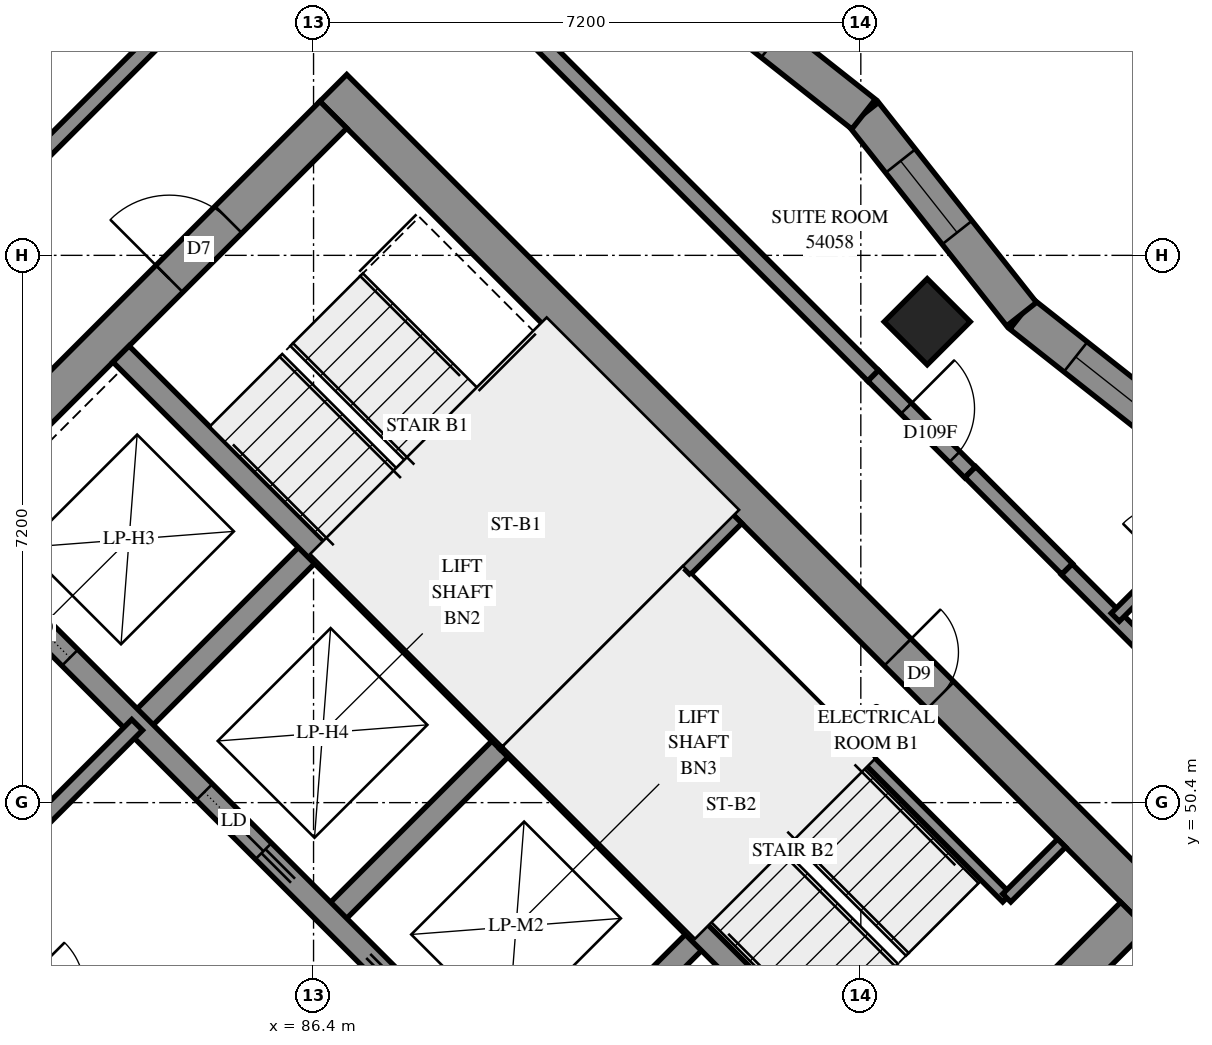
"""IFC4 building model, lengths in metres.
Left out: names, types, materials, properties, quantities, classifications, styles, units other than length and angle.
Written with IfcOpenShell. Run it as: python <this file> out.ifc"""

import sys

from ifc_helpers import new_model, si_unit, direction, frame, frame_2d, origin, origin_2d, place, context, subcontext, project, spatial, polyline, rectangle, outline, extrude, element, fill, save


model = new_model("IFC4")
c1 = context("Model", 3, precision=1e-05, world=origin(), true_north=direction((0.0, 1.0)))
c2 = subcontext(c1, "Body", "Model", "MODEL_VIEW")
j1 = project(units=[si_unit("LENGTHUNIT", "METRE"), si_unit("PLANEANGLEUNIT", "RADIAN")], contexts=[c1])
p1 = place(None, origin())
s1 = spatial("IfcSite", under=j1, at=p1, CompositionType="ELEMENT")
p2 = place(p1, origin())
s2 = spatial("IfcBuilding", under=s1, at=p2, CompositionType="ELEMENT")
p3 = place(p2, frame((0.0, 0.0, 199.8)))
s3 = spatial("IfcBuildingStorey", under=s2, at=p3, CompositionType="ELEMENT", Elevation=199.8)
p4 = place(p3, frame((94.474, 56.727, 0.0), z_axis=(0.0, 0.0, 1.0), x_axis=(0.7071067812, -0.7071067812, 0.0)))
e1 = element("IfcColumn", 1, at=p4, inside=s3, PredefinedType="COLUMN", context=c2, shape_type="SweptSolid", body=[
    extrude(rectangle(XDim=0.8, YDim=0.8, at=origin_2d()), origin(), (0.0, 0.0, 1.0), 3.1),
])
p5 = place(p3, frame((76.124, 49.267, -0.3), z_axis=(0.0, 0.0, 1.0), x_axis=(0.7071067812, -0.7071067812, 0.0)))
e2 = element("IfcWall", 2, at=p5, inside=s3, PredefinedType="SHEAR", context=c2, shape_type="SweptSolid", body=[
    extrude(rectangle(XDim=15.4, YDim=0.5, at=frame_2d((7.7, 0.0))), origin(), (0.0, 0.0, 1.0), 2.7),
])
p6 = place(p3, frame((86.66, 59.802, -0.3), z_axis=(0.0, 0.0, 1.0), x_axis=(0.7071067812, -0.7071067812, 0.0)))
e3 = element("IfcWall", 3, at=p6, inside=s3, PredefinedType="SHEAR", context=c2, shape_type="SweptSolid", body=[
    extrude(rectangle(XDim=15.4, YDim=0.5, at=frame_2d((7.7, 0.0))), origin(), (0.0, 0.0, 1.0), 2.7),
])
p7 = place(p6, frame((10.5, 0.0, 0.3)))
e4 = element("IfcOpeningElement", 4, at=p7, cuts=e3, PredefinedType="OPENING", context=c2, shape_type="SweptSolid", body=[
    extrude(rectangle(XDim=0.8, YDim=2.1, at=frame_2d((0.4, 1.05))), frame((0.0, 0.26, 0.0), z_axis=(0.0, -1.0, 0.0), x_axis=(1.0, 0.0, 0.0)), (0.0, 0.0, 1.0), 0.52),
])
p8 = place(p3, frame((76.478, 49.267, -0.3), z_axis=(0.0, 0.0, 1.0), x_axis=(0.7071067812, 0.7071067812, 0.0)))
e5 = element("IfcWall", 5, at=p8, inside=s3, PredefinedType="SHEAR", context=c2, shape_type="SweptSolid", body=[
    extrude(rectangle(XDim=14.4, YDim=0.5, at=frame_2d((7.2, 0.0))), origin(), (0.0, 0.0, 1.0), 2.7),
])
p9 = place(p8, frame((4.55, 0.0, 0.3)))
e6 = element("IfcOpeningElement", 6, at=p9, cuts=e5, PredefinedType="OPENING", context=c2, shape_type="SweptSolid", body=[
    extrude(rectangle(XDim=1.1, YDim=2.1, at=frame_2d((0.55, 1.05))), frame((0.0, 0.26, 0.0), z_axis=(0.0, -1.0, 0.0), x_axis=(1.0, 0.0, 0.0)), (0.0, 0.0, 1.0), 0.52),
])
p10 = place(p8, frame((11.35, 0.0, 0.3)))
e7 = element("IfcOpeningElement", 7, at=p10, cuts=e5, PredefinedType="OPENING", context=c2, shape_type="SweptSolid", body=[
    extrude(rectangle(XDim=1.1, YDim=2.1, at=frame_2d((0.55, 1.05))), frame((0.0, 0.26, 0.0), z_axis=(0.0, -1.0, 0.0), x_axis=(1.0, 0.0, 0.0)), (0.0, 0.0, 1.0), 0.52),
])
p11 = place(p3, frame((87.013, 38.731, -0.3), z_axis=(0.0, 0.0, 1.0), x_axis=(0.7071067812, 0.7071067812, 0.0)))
e8 = element("IfcWall", 8, at=p11, inside=s3, PredefinedType="SHEAR", context=c2, shape_type="SweptSolid", body=[
    extrude(rectangle(XDim=14.4, YDim=0.5, at=frame_2d((7.2, 0.0))), origin(), (0.0, 0.0, 1.0), 2.7),
])
p12 = place(p11, frame((4.55, 0.0, 0.3)))
e9 = element("IfcOpeningElement", 9, at=p12, cuts=e8, PredefinedType="OPENING", context=c2, shape_type="SweptSolid", body=[
    extrude(rectangle(XDim=1.1, YDim=2.1, at=frame_2d((0.55, 1.05))), frame((0.0, 0.26, 0.0), z_axis=(0.0, -1.0, 0.0), x_axis=(1.0, 0.0, 0.0)), (0.0, 0.0, 1.0), 0.52),
])
p13 = place(p11, frame((11.35, 0.0, 0.3)))
e10 = element("IfcOpeningElement", 10, at=p13, cuts=e8, PredefinedType="OPENING", context=c2, shape_type="SweptSolid", body=[
    extrude(rectangle(XDim=1.1, YDim=2.1, at=frame_2d((0.55, 1.05))), frame((0.0, 0.26, 0.0), z_axis=(0.0, -1.0, 0.0), x_axis=(1.0, 0.0, 0.0)), (0.0, 0.0, 1.0), 0.52),
])
p14 = place(p3, frame((84.079, 51.423, 0.0), z_axis=(0.0, 0.0, 1.0), x_axis=(0.7071219326, 0.7070916295, 0.0)))
e11 = element("IfcWall", 11, at=p14, inside=s3, PredefinedType="SOLIDWALL", context=c2, shape_type="SweptSolid", body=[
    extrude(rectangle(XDim=3.3, YDim=0.3, at=frame_2d((1.65, 0.0))), origin(), (0.0, 0.0, 1.0), 3.1),
])
for number, where, z_axis, x_axis in (
    (12, (86.625, 48.878, 0.0), (0.0, 0.0, 1.0), (0.707, 0.707, 0.0)),
    (13, (89.17, 46.332, 0.0), (0.0, 0.0, 1.0), (0.707, 0.707, 0.0)),
):
    element("IfcWall", number, at=place(p3, frame(where, z_axis=z_axis, x_axis=x_axis)), inside=s3, PredefinedType="SOLIDWALL", context=c2, shape_type="SweptSolid", body=[
        extrude(rectangle(XDim=3.3, YDim=0.3, at=frame_2d((1.65, 0.0))), origin(), (0.0, 0.0, 1.0), 3.1),
    ])
p15 = place(p3, frame((78.988, 51.423, 0.0), z_axis=(0.0, 0.0, 1.0), x_axis=(0.7071067812, -0.7071067812, 0.0)))
e14 = element("IfcWall", 14, at=p15, inside=s3, PredefinedType="SOLIDWALL", context=c2, shape_type="SweptSolid", body=[
    extrude(rectangle(XDim=14.4, YDim=0.3, at=frame_2d((7.2, 0.0))), origin(), (0.0, 0.0, 1.0), 3.1),
])
p16 = place(p15, frame((1.35, 0.0, 0.0)))
e15 = element("IfcOpeningElement", 15, at=p16, cuts=e14, PredefinedType="OPENING", context=c2, shape_type="SweptSolid", body=[
    extrude(rectangle(XDim=0.9, YDim=2.1, at=frame_2d((0.45, 1.05))), frame((0.0, 0.16, 0.0), z_axis=(0.0, -1.0, 0.0), x_axis=(1.0, 0.0, 0.0)), (0.0, 0.0, 1.0), 0.32),
])
p17 = place(p15, frame((4.95, 0.0, 0.0)))
e16 = element("IfcOpeningElement", 16, at=p17, cuts=e14, PredefinedType="OPENING", context=c2, shape_type="SweptSolid", body=[
    extrude(rectangle(XDim=0.9, YDim=2.1, at=frame_2d((0.45, 1.05))), frame((0.0, 0.16, 0.0), z_axis=(0.0, -1.0, 0.0), x_axis=(1.0, 0.0, 0.0)), (0.0, 0.0, 1.0), 0.32),
])
p18 = place(p15, frame((8.55, 0.0, 0.0)))
e17 = element("IfcOpeningElement", 17, at=p18, cuts=e14, PredefinedType="OPENING", context=c2, shape_type="SweptSolid", body=[
    extrude(rectangle(XDim=0.9, YDim=2.1, at=frame_2d((0.45, 1.05))), frame((0.0, 0.16, 0.0), z_axis=(0.0, -1.0, 0.0), x_axis=(1.0, 0.0, 0.0)), (0.0, 0.0, 1.0), 0.32),
])
p19 = place(p15, frame((12.05, 0.0, 0.0)))
e18 = element("IfcOpeningElement", 18, at=p19, cuts=e14, PredefinedType="OPENING", context=c2, shape_type="SweptSolid", body=[
    extrude(rectangle(XDim=1.1, YDim=2.1, at=frame_2d((0.55, 1.05))), frame((0.0, 0.16, 0.0), z_axis=(0.0, -1.0, 0.0), x_axis=(1.0, 0.0, 0.0)), (0.0, 0.0, 1.0), 0.32),
])
p20 = place(p3, frame((81.534, 53.969, 0.0), z_axis=(0.0, 0.0, 1.0), x_axis=(0.707103309, -0.7071102534, 0.0)))
e19 = element("IfcWall", 19, at=p20, inside=s3, PredefinedType="SOLIDWALL", context=c2, shape_type="SweptSolid", body=[
    extrude(rectangle(XDim=14.4, YDim=0.3, at=frame_2d((7.2, 0.0))), origin(), (0.0, 0.0, 1.0), 3.1),
])
p21 = place(p20, frame((1.25, 0.0, 0.0)))
e20 = element("IfcOpeningElement", 20, at=p21, cuts=e19, PredefinedType="OPENING", context=c2, shape_type="SweptSolid", body=[
    extrude(rectangle(XDim=1.1, YDim=2.1, at=frame_2d((0.55, 1.05))), frame((0.0, 0.16, 0.0), z_axis=(0.0, -1.0, 0.0), x_axis=(1.0, 0.0, 0.0)), (0.0, 0.0, 1.0), 0.32),
])
p22 = place(p20, frame((4.85, 0.0, 0.0)))
e21 = element("IfcOpeningElement", 21, at=p22, cuts=e19, PredefinedType="OPENING", context=c2, shape_type="SweptSolid", body=[
    extrude(rectangle(XDim=1.1, YDim=2.1, at=frame_2d((0.55, 1.05))), frame((0.0, 0.16, 0.0), z_axis=(0.0, -1.0, 0.0), x_axis=(1.0, 0.0, 0.0)), (0.0, 0.0, 1.0), 0.32),
])
p23 = place(p20, frame((8.45, 0.0, 0.0)))
e22 = element("IfcOpeningElement", 22, at=p23, cuts=e19, PredefinedType="OPENING", context=c2, shape_type="SweptSolid", body=[
    extrude(rectangle(XDim=1.1, YDim=2.1, at=frame_2d((0.55, 1.05))), frame((0.0, 0.16, 0.0), z_axis=(0.0, -1.0, 0.0), x_axis=(1.0, 0.0, 0.0)), (0.0, 0.0, 1.0), 0.32),
])
p24 = place(p20, frame((12.05, 0.0, 0.0)))
e23 = element("IfcOpeningElement", 23, at=p24, cuts=e19, PredefinedType="OPENING", context=c2, shape_type="SweptSolid", body=[
    extrude(rectangle(XDim=1.1, YDim=2.1, at=frame_2d((0.55, 1.05))), frame((0.0, 0.16, 0.0), z_axis=(0.0, -1.0, 0.0), x_axis=(1.0, 0.0, 0.0)), (0.0, 0.0, 1.0), 0.32),
])
for number, where, z_axis, x_axis in (
    (24, (83.867, 56.302, 0.0), (0.0, 0.0, 1.0), (0.707, -0.707, 0.0)),
    (25, (88.958, 51.211, 0.0), (0.0, 0.0, 1.0), (0.707, -0.707, 0.0)),
):
    element("IfcWall", number, at=place(p3, frame(where, z_axis=z_axis, x_axis=x_axis)), inside=s3, PredefinedType="SOLIDWALL", context=c2, shape_type="SweptSolid", body=[
        extrude(rectangle(XDim=7.2, YDim=0.3, at=frame_2d((3.6, 0.0))), origin(), (0.0, 0.0, 1.0), 3.1),
    ])
p25 = place(p3, frame((88.958, 51.211, 0.0), z_axis=(0.0, 0.0, 1.0), x_axis=(0.7071067812, 0.7071067812, 0.0)))
e26 = element("IfcWall", 26, at=p25, inside=s3, PredefinedType="SOLIDWALL", context=c2, shape_type="SweptSolid", body=[
    extrude(rectangle(XDim=4.2, YDim=0.3, at=frame_2d((2.1, 0.0))), origin(), (0.0, 0.0, 1.0), 3.1),
])
p26 = place(p3, frame((98.347, 54.747, 0.0), z_axis=(0.0, 0.0, 1.0), x_axis=(-0.7847316147, 0.6198356984, 0.0)))
e27 = element("IfcWall", 27, at=p26, inside=s3, PredefinedType="SOLIDWALL", context=c2, shape_type="SweptSolid", body=[
    extrude(outline(polyline([(-0.029, -0.25), (3.324, -0.25), (3.383, 0.25), (0.029, 0.25), (-0.029, -0.25)])), origin(), (0.0, 0.0, 1.0), 3.1),
])
p27 = place(p26, frame((1.248, 0.0, 0.45)))
e28 = element("IfcOpeningElement", 28, at=p27, cuts=e27, PredefinedType="OPENING", context=c2, shape_type="SweptSolid", body=[
    extrude(rectangle(XDim=1.2, YDim=2.5, at=frame_2d((0.6, 1.25))), frame((0.0, 0.26, 0.0), z_axis=(0.0, -1.0, 0.0), x_axis=(1.0, 0.0, 0.0)), (0.0, 0.0, 1.0), 0.52),
])
p28 = place(p3, frame((95.715, 56.826, 0.0), z_axis=(0.0, 0.0, 1.0), x_axis=(-0.6198356984, 0.7847316147, 0.0)))
e29 = element("IfcWall", 29, at=p28, inside=s3, PredefinedType="SOLIDWALL", context=c2, shape_type="SweptSolid", body=[
    extrude(outline(polyline([(0.029, -0.25), (3.383, -0.25), (3.324, 0.25), (-0.029, 0.25), (0.029, -0.25)])), origin(), (0.0, 0.0, 1.0), 3.1),
])
p29 = place(p28, frame((1.369, 0.0, 0.45)))
e30 = element("IfcOpeningElement", 30, at=p29, cuts=e29, PredefinedType="OPENING", context=c2, shape_type="SweptSolid", body=[
    extrude(rectangle(XDim=1.2, YDim=2.5, at=frame_2d((0.6, 1.25))), frame((0.0, 0.26, 0.0), z_axis=(0.0, -1.0, 0.0), x_axis=(1.0, 0.0, 0.0)), (0.0, 0.0, 1.0), 0.52),
])
p30 = place(p3, frame((93.636, 59.458, 0.0), z_axis=(0.0, 0.0, 1.0), x_axis=(-0.7847316147, 0.6198356984, 0.0)))
e31 = element("IfcWall", 31, at=p30, inside=s3, PredefinedType="SOLIDWALL", context=c2, shape_type="SweptSolid", body=[
    extrude(outline(polyline([(-0.029, -0.25), (3.324, -0.25), (3.383, 0.25), (0.029, 0.25), (-0.029, -0.25)])), origin(), (0.0, 0.0, 1.0), 3.1),
])
p31 = place(p30, frame((1.519, 0.0, 0.45)))
e32 = element("IfcOpeningElement", 32, at=p31, cuts=e31, PredefinedType="OPENING", context=c2, shape_type="SweptSolid", body=[
    extrude(rectangle(XDim=1.2, YDim=2.5, at=frame_2d((0.6, 1.25))), frame((0.0, 0.26, 0.0), z_axis=(0.0, -1.0, 0.0), x_axis=(1.0, 0.0, 0.0)), (0.0, 0.0, 1.0), 0.52),
])
p32 = place(p3, frame((91.313, 53.354, 0.0), z_axis=(0.0, 0.0, 1.0), x_axis=(0.7071067812, -0.7071067812, 0.0)))
e33 = element("IfcWall", 33, at=p32, inside=s3, PredefinedType="PARTITIONING", context=c2, shape_type="SweptSolid", body=[
    extrude(rectangle(XDim=5.95, YDim=0.15, at=frame_2d((2.975, 0.0))), origin(), (0.0, 0.0, 1.0), 3.1),
])
p33 = place(p3, frame((95.52, 49.146, 0.0), z_axis=(0.0, 0.0, 1.0), x_axis=(0.7071067812, 0.7071067812, 0.0)))
e34 = element("IfcWall", 34, at=p33, inside=s3, PredefinedType="PARTITIONING", context=c2, shape_type="SweptSolid", body=[
    extrude(rectangle(XDim=1.02, YDim=0.15, at=frame_2d((0.51, 0.0))), origin(), (0.0, 0.0, 1.0), 3.1),
])
p34 = place(p3, frame((81.534, 48.878, 0.0), z_axis=(0.0, 0.0, 1.0), x_axis=(0.707092892, 0.7071206701, 0.0)))
e35 = element("IfcWall", 35, at=p34, inside=s3, PredefinedType="PARTITIONING", context=c2, shape_type="SweptSolid", body=[
    extrude(rectangle(XDim=3.6, YDim=0.2, at=frame_2d((1.8, 0.0))), origin(), (0.0, 0.0, 1.0), 3.1),
])
p35 = place(p3, frame((93.695, 42.091, 0.0), z_axis=(0.0, 0.0, 1.0), x_axis=(0.7071067812, 0.7071067812, 0.0)))
e36 = element("IfcWall", 36, at=p35, inside=s3, PredefinedType="PARTITIONING", context=c2, shape_type="SweptSolid", body=[
    extrude(rectangle(XDim=9.899, YDim=0.2, at=frame_2d((4.95, 0.0))), origin(), (0.0, 0.0, 1.0), 3.1),
])
p36 = place(p35, frame((0.255, 0.0, 0.0)))
e37 = element("IfcOpeningElement", 37, at=p36, cuts=e36, PredefinedType="OPENING", context=c2, shape_type="SweptSolid", body=[
    extrude(rectangle(XDim=1.0, YDim=2.1, at=frame_2d((0.5, 1.05))), frame((0.0, 0.11, 0.0), z_axis=(0.0, -1.0, 0.0), x_axis=(1.0, 0.0, 0.0)), (0.0, 0.0, 1.0), 0.22),
])
p37 = place(p3, frame((79.837, 55.951, 0.0), z_axis=(0.0, 0.0, 1.0), x_axis=(0.7071067812, 0.7071067812, 0.0)))
e38 = element("IfcWall", 38, at=p37, inside=s3, PredefinedType="PARTITIONING", context=c2, shape_type="SweptSolid", body=[
    extrude(rectangle(XDim=9.897, YDim=0.2, at=frame_2d((4.948, 0.0))), origin(), (0.0, 0.0, 1.0), 3.1),
])
p38 = place(p37, frame((0.873, 0.0, 0.0)))
e39 = element("IfcOpeningElement", 39, at=p38, cuts=e38, PredefinedType="OPENING", context=c2, shape_type="SweptSolid", body=[
    extrude(rectangle(XDim=1.0, YDim=2.1, at=frame_2d((0.5, 1.05))), frame((0.0, 0.11, 0.0), z_axis=(0.0, -1.0, 0.0), x_axis=(1.0, 0.0, 0.0)), (0.0, 0.0, 1.0), 0.22),
])
p39 = place(p3, frame((86.835, 62.945, 0.0), z_axis=(0.0, 0.0, 1.0), x_axis=(0.7071067812, -0.7071067812, 0.0)))
e40 = element("IfcWall", 40, at=p39, inside=s3, PredefinedType="PARTITIONING", context=c2, shape_type="SweptSolid", body=[
    extrude(rectangle(XDim=9.798, YDim=0.2, at=frame_2d((4.899, 0.0))), origin(), (0.0, 0.0, 1.0), 3.1),
])
p40 = place(p3, frame((96.309, 53.471, 0.0), z_axis=(0.0, 0.0, 1.0), x_axis=(0.7071067812, -0.7071067812, 0.0)))
e41 = element("IfcWall", 41, at=p40, inside=s3, PredefinedType="PARTITIONING", context=c2, shape_type="SweptSolid", body=[
    extrude(rectangle(XDim=6.2, YDim=0.2, at=frame_2d((3.1, 0.0))), origin(), (0.0, 0.0, 1.0), 3.1),
])
p41 = place(p3, frame((96.948, 52.838, 0.0), z_axis=(0.0, 0.0, 1.0), x_axis=(0.7070823329, 0.7071312287, 0.0)))
e42 = element("IfcWall", 42, at=p41, inside=s3, PredefinedType="PARTITIONING", context=c2, shape_type="SweptSolid", body=[
    extrude(rectangle(XDim=2.045, YDim=0.15, at=frame_2d((1.023, 0.0))), origin(), (0.0, 0.0, 1.0), 3.1),
])
p42 = place(p41, frame((0.943, 0.0, 0.0)))
e43 = element("IfcOpeningElement", 43, at=p42, cuts=e42, PredefinedType="OPENING", context=c2, shape_type="SweptSolid", body=[
    extrude(rectangle(XDim=0.8, YDim=2.1, at=frame_2d((0.4, 1.05))), frame((0.0, 0.085, 0.0), z_axis=(0.0, -1.0, 0.0), x_axis=(1.0, 0.0, 0.0)), (0.0, 0.0, 1.0), 0.17),
])
p43 = place(p3, frame((93.763, 56.017, 0.0), z_axis=(0.0, 0.0, 1.0), x_axis=(0.7076620277, -0.7065510983, 0.0)))
e44 = element("IfcWall", 44, at=p43, inside=s3, PredefinedType="PARTITIONING", context=c2, shape_type="SweptSolid", body=[
    extrude(rectangle(XDim=1.8, YDim=0.2, at=frame_2d((0.9, 0.0))), origin(), (0.0, 0.0, 1.0), 3.1),
])
p44 = place(p43, frame((0.612, 0.0, 0.0)))
e45 = element("IfcOpeningElement", 45, at=p44, cuts=e44, PredefinedType="OPENING", context=c2, shape_type="SweptSolid", body=[
    extrude(rectangle(XDim=0.9, YDim=2.1, at=frame_2d((0.45, 1.05))), frame((0.0, 0.11, 0.0), z_axis=(0.0, -1.0, 0.0), x_axis=(1.0, 0.0, 0.0)), (0.0, 0.0, 1.0), 0.22),
])
p45 = place(p3, frame((95.041, 54.749, 0.0), z_axis=(0.0, 0.0, 1.0), x_axis=(0.7065510983, -0.7076620277, 0.0)))
e46 = element("IfcWall", 46, at=p45, inside=s3, PredefinedType="PARTITIONING", context=c2, shape_type="SweptSolid", body=[
    extrude(rectangle(XDim=1.8, YDim=0.2, at=frame_2d((0.9, 0.0))), origin(), (0.0, 0.0, 1.0), 3.1),
])
p46 = place(p27, origin())
e47 = element("IfcWindow", 47, at=p46, inside=s3, PartitioningType="SINGLE_PANEL", PredefinedType="WINDOW", context=c2, shape_type="SweptSolid", body=[
    extrude(rectangle(XDim=1.2, YDim=2.5, at=frame_2d((0.6, 1.25))), frame((0.0, 0.18, 0.0), z_axis=(0.0, -1.0, 0.0), x_axis=(1.0, 0.0, 0.0)), (0.0, 0.0, 1.0), 0.06),
])
fill(e28, e47)
p47 = place(p29, origin())
e48 = element("IfcWindow", 48, at=p47, inside=s3, PartitioningType="SINGLE_PANEL", PredefinedType="WINDOW", context=c2, shape_type="SweptSolid", body=[
    extrude(rectangle(XDim=1.2, YDim=2.5, at=frame_2d((0.6, 1.25))), frame((0.0, 0.18, 0.0), z_axis=(0.0, -1.0, 0.0), x_axis=(1.0, 0.0, 0.0)), (0.0, 0.0, 1.0), 0.06),
])
fill(e30, e48)
p48 = place(p31, origin())
e49 = element("IfcWindow", 49, at=p48, inside=s3, PartitioningType="SINGLE_PANEL", PredefinedType="WINDOW", context=c2, shape_type="SweptSolid", body=[
    extrude(rectangle(XDim=1.2, YDim=2.5, at=frame_2d((0.6, 1.25))), frame((0.0, 0.18, 0.0), z_axis=(0.0, -1.0, 0.0), x_axis=(1.0, 0.0, 0.0)), (0.0, 0.0, 1.0), 0.06),
])
fill(e32, e49)
p49 = place(p7, origin())
e50 = element("IfcDoor", 50, at=p49, inside=s3, OperationType="SINGLE_SWING_RIGHT", PredefinedType="DOOR", context=c2, shape_type="SweptSolid", body=[
    extrude(rectangle(XDim=0.8, YDim=2.1, at=frame_2d((0.4, 1.05))), frame((0.0, 0.025, 0.0), z_axis=(0.0, -1.0, 0.0), x_axis=(1.0, 0.0, 0.0)), (0.0, 0.0, 1.0), 0.05),
])
fill(e4, e50)
p50 = place(p10, origin())
e51 = element("IfcDoor", 51, at=p50, inside=s3, OperationType="SINGLE_SWING_LEFT", PredefinedType="DOOR", context=c2, shape_type="SweptSolid", body=[
    extrude(rectangle(XDim=1.1, YDim=2.1, at=frame_2d((0.55, 1.05))), frame((0.0, 0.025, 0.0), z_axis=(0.0, -1.0, 0.0), x_axis=(1.0, 0.0, 0.0)), (0.0, 0.0, 1.0), 0.05),
])
fill(e7, e51)
p51 = place(p21, origin())
e52 = element("IfcDoor", 52, at=p51, inside=s3, OperationType="SLIDING_TO_LEFT", PredefinedType="DOOR", context=c2, shape_type="SweptSolid", body=[
    extrude(rectangle(XDim=1.1, YDim=2.1, at=frame_2d((0.55, 1.05))), frame((0.0, 0.025, 0.0), z_axis=(0.0, -1.0, 0.0), x_axis=(1.0, 0.0, 0.0)), (0.0, 0.0, 1.0), 0.05),
])
fill(e20, e52)
p52 = place(p22, origin())
e53 = element("IfcDoor", 53, at=p52, inside=s3, OperationType="SLIDING_TO_RIGHT", PredefinedType="DOOR", context=c2, shape_type="SweptSolid", body=[
    extrude(rectangle(XDim=1.1, YDim=2.1, at=frame_2d((0.55, 1.05))), frame((0.0, 0.025, 0.0), z_axis=(0.0, -1.0, 0.0), x_axis=(1.0, 0.0, 0.0)), (0.0, 0.0, 1.0), 0.05),
])
fill(e21, e53)
p53 = place(p44, origin())
e54 = element("IfcDoor", 54, at=p53, inside=s3, OperationType="SINGLE_SWING_LEFT", PredefinedType="DOOR", context=c2, shape_type="SweptSolid", body=[
    extrude(rectangle(XDim=0.9, YDim=2.1, at=frame_2d((0.45, 1.05))), frame((0.0, 0.025, 0.0), z_axis=(0.0, -1.0, 0.0), x_axis=(1.0, 0.0, 0.0)), (0.0, 0.0, 1.0), 0.05),
])
fill(e45, e54)
save(model, sys.argv[1])
